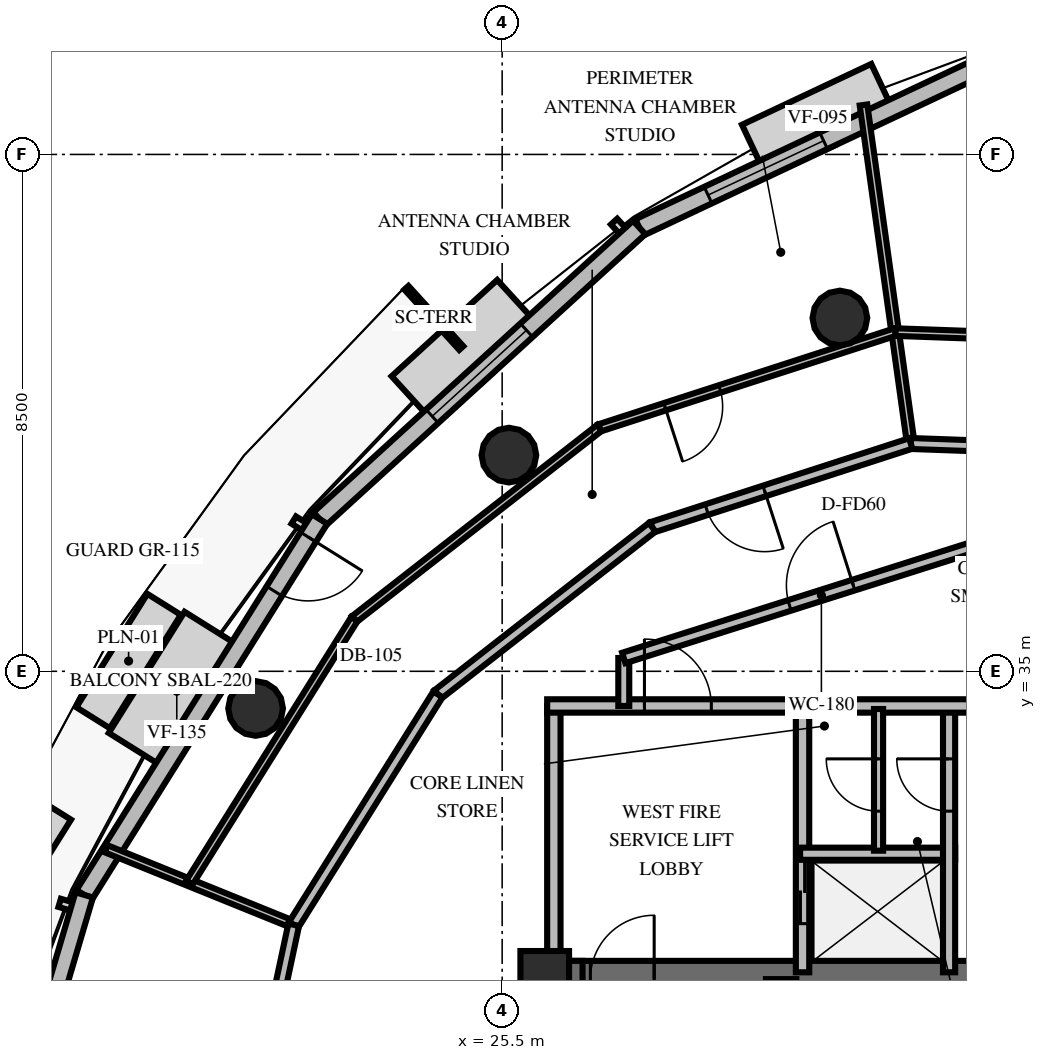
"""IFC4 building model, lengths in metres.
Left out: names, types, materials, properties, quantities, classifications, styles, units other than length and angle.
Written with IfcOpenShell. Run it as: python <this file> out.ifc"""

import sys

from ifc_helpers import new_model, si_unit, direction, frame, frame_2d, origin, origin_2d, place, context, subcontext, project, spatial, rectangle, circle, extrude, element, fill, save


model = new_model("IFC4")
c1 = context("Model", 3, precision=1e-05, world=origin(), true_north=direction((0.0, 1.0)))
c2 = subcontext(c1, "Body", "Model", "MODEL_VIEW")
j1 = project(units=[si_unit("LENGTHUNIT", "METRE"), si_unit("PLANEANGLEUNIT", "RADIAN")], contexts=[c1])
p1 = place(None, origin())
s1 = spatial("IfcSite", under=j1, at=p1, CompositionType="ELEMENT")
p2 = place(p1, origin())
s2 = spatial("IfcBuilding", under=s1, at=p2, CompositionType="ELEMENT")
p3 = place(p2, frame((0.0, 0.0, 270.0)))
s3 = spatial("IfcBuildingStorey", under=s2, at=p3, CompositionType="ELEMENT", Elevation=270.0)
p4 = place(p3, frame((26.222, 29.938, 0.0), z_axis=(0.0, 0.0, 1.0), x_axis=(1.0, 0.0, 0.0)))
e1 = element("IfcWall", 1, at=p4, inside=s3, PredefinedType="SHEAR", context=c2, shape_type="SweptSolid", body=[
    extrude(rectangle(XDim=15.566, YDim=0.6, at=frame_2d((7.783, 0.0))), origin(), (0.0, 0.0, 1.0), 3.6),
])
p5 = place(p4, frame((0.728, 0.0, 0.0)))
e2 = element("IfcOpeningElement", 2, at=p5, cuts=e1, PredefinedType="OPENING", context=c2, shape_type="SweptSolid", body=[
    extrude(rectangle(XDim=1.05, YDim=2.15, at=frame_2d((0.525, 1.075))), frame((0.0, 0.31, 0.0), z_axis=(0.0, -1.0, 0.0), x_axis=(1.0, 0.0, 0.0)), (0.0, 0.0, 1.0), 0.62),
])
p6 = place(p4, frame((13.778, 0.0, 0.0)))
e3 = element("IfcOpeningElement", 3, at=p6, cuts=e1, PredefinedType="OPENING", context=c2, shape_type="SweptSolid", body=[
    extrude(rectangle(XDim=1.05, YDim=2.15, at=frame_2d((0.525, 1.075))), frame((0.0, 0.31, 0.0), z_axis=(0.0, -1.0, 0.0), x_axis=(1.0, 0.0, 0.0)), (0.0, 0.0, 1.0), 0.62),
])
p7 = place(p4, frame((7.228, 0.0, 0.0)))
e4 = element("IfcOpeningElement", 4, at=p7, cuts=e1, PredefinedType="OPENING", context=c2, shape_type="SweptSolid", body=[
    extrude(rectangle(XDim=1.1, YDim=2.15, at=frame_2d((0.55, 1.075))), frame((0.0, 0.31, 0.0), z_axis=(0.0, -1.0, 0.0), x_axis=(1.0, 0.0, 0.0)), (0.0, 0.0, 1.0), 0.62),
])
p8 = place(p3, frame((26.522, 19.962, 0.0), z_axis=(0.0, 0.0, 1.0), x_axis=(0.0, 1.0, 0.0)))
e5 = element("IfcWall", 5, at=p8, inside=s3, PredefinedType="SHEAR", context=c2, shape_type="SweptSolid", body=[
    extrude(rectangle(XDim=10.276, YDim=0.6, at=frame_2d((5.138, 0.0))), origin(), (0.0, 0.0, 1.0), 3.6),
])
p9 = place(p3, frame((30.088, 20.262, 0.0), z_axis=(0.0, 0.0, 1.0), x_axis=(0.0, 1.0, 0.0)))
e6 = element("IfcWall", 6, at=p9, inside=s3, PredefinedType="SHEAR", context=c2, shape_type="SweptSolid", body=[
    extrude(rectangle(XDim=9.676, YDim=0.5, at=frame_2d((4.838, 0.0))), origin(), (0.0, 0.0, 1.0), 3.6),
])
p10 = place(p3, frame((26.2, 30.0, 0.0), z_axis=(0.0, 0.0, 1.0), x_axis=(1.0, 0.0, 0.0)))
e7 = element("IfcColumn", 7, at=p10, inside=s3, PredefinedType="PILASTER", context=c2, shape_type="SweptSolid", body=[
    extrude(rectangle(XDim=0.8, YDim=0.8, at=origin_2d()), origin(), (0.0, 0.0, 1.0), 3.6),
])
for number, where, z_axis, x_axis in (
    (8, (31.054, 40.81, 0.0), (0.0, 0.0, 1.0), (1.0, 0.0, 0.0)),
    (9, (25.611, 38.555, 0.0), (0.0, 0.0, 1.0), (1.0, 0.0, 0.0)),
    (10, (21.445, 34.389, 0.0), (0.0, 0.0, 1.0), (1.0, 0.0, 0.0)),
):
    element("IfcColumn", number, at=place(p3, frame(where, z_axis=z_axis, x_axis=x_axis)), inside=s3, PredefinedType="COLUMN", context=c2, shape_type="SweptSolid", body=[
        extrude(circle(Radius=0.45, at=origin_2d()), origin(), (0.0, 0.0, 1.0), 3.6),
    ])
p11 = place(p3, frame((33.765, 45.127, 0.0), z_axis=(0.0, 0.0, 1.0), x_axis=(-0.904858675558, -0.425712082595, 0.0)))
e11 = element("IfcWall", 11, at=p11, inside=s3, PredefinedType="SOLIDWALL", context=c2, shape_type="SweptSolid", body=[
    extrude(rectangle(XDim=6.643, YDim=0.3, at=frame_2d((3.322, 0.0))), origin(), (0.0, 0.0, 1.0), 2.76),
])
p12 = place(p11, frame((3.292, 0.0, 0.8)))
e12 = element("IfcOpeningElement", 12, at=p12, cuts=e11, PredefinedType="OPENING", context=c2, shape_type="SweptSolid", body=[
    extrude(rectangle(XDim=2.1, YDim=1.85, at=frame_2d((1.05, 0.925))), frame((0.0, 0.16, 0.0), z_axis=(0.0, -1.0, 0.0), x_axis=(1.0, 0.0, 0.0)), (0.0, 0.0, 1.0), 0.32),
])
p13 = place(p3, frame((27.754, 42.299, 0.0), z_axis=(0.0, 0.0, 1.0), x_axis=(-0.738936247596, -0.673775349793, 0.0)))
e13 = element("IfcWall", 13, at=p13, inside=s3, PredefinedType="SOLIDWALL", context=c2, shape_type="SweptSolid", body=[
    extrude(rectangle(XDim=7.115, YDim=0.3, at=frame_2d((3.558, 0.0))), origin(), (0.0, 0.0, 1.0), 2.76),
])
p14 = place(p13, frame((2.508, 0.0, 0.8)))
e14 = element("IfcOpeningElement", 14, at=p14, cuts=e13, PredefinedType="OPENING", context=c2, shape_type="SweptSolid", body=[
    extrude(rectangle(XDim=2.1, YDim=1.85, at=frame_2d((1.05, 0.925))), frame((0.0, 0.16, 0.0), z_axis=(0.0, -1.0, 0.0), x_axis=(1.0, 0.0, 0.0)), (0.0, 0.0, 1.0), 0.32),
])
p15 = place(p3, frame((22.496, 37.505, 0.0), z_axis=(0.0, 0.0, 1.0), x_axis=(-0.530648729616, -0.847591839129, 0.0)))
e15 = element("IfcWall", 15, at=p15, inside=s3, PredefinedType="SOLIDWALL", context=c2, shape_type="SweptSolid", body=[
    extrude(rectangle(XDim=7.293, YDim=0.3, at=frame_2d((3.646, 0.0))), origin(), (0.0, 0.0, 1.0), 2.76),
])
p16 = place(p15, frame((0.35, 0.0, 0.0)))
e16 = element("IfcOpeningElement", 16, at=p16, cuts=e15, PredefinedType="OPENING", context=c2, shape_type="SweptSolid", body=[
    extrude(rectangle(XDim=1.05, YDim=2.15, at=frame_2d((0.525, 1.075))), frame((0.0, 0.16, 0.0), z_axis=(0.0, -1.0, 0.0), x_axis=(1.0, 0.0, 0.0)), (0.0, 0.0, 1.0), 0.32),
])
p17 = place(p3, frame((18.626, 31.323, 0.0), z_axis=(0.0, 0.0, 1.0), x_axis=(-0.283347575433, -0.959017284253, 0.0)))
e17 = element("IfcWall", 17, at=p17, inside=s3, PredefinedType="SOLIDWALL", context=c2, shape_type="SweptSolid", body=[
    extrude(rectangle(XDim=7.115, YDim=0.3, at=frame_2d((3.558, 0.0))), origin(), (0.0, 0.0, 1.0), 2.76),
])
p18 = place(p17, frame((2.508, 0.0, 0.8)))
e18 = element("IfcOpeningElement", 18, at=p18, cuts=e17, PredefinedType="OPENING", context=c2, shape_type="SweptSolid", body=[
    extrude(rectangle(XDim=2.1, YDim=1.85, at=frame_2d((1.05, 0.925))), frame((0.0, 0.16, 0.0), z_axis=(0.0, -1.0, 0.0), x_axis=(1.0, 0.0, 0.0)), (0.0, 0.0, 1.0), 0.32),
])
p19 = place(p3, frame((26.35, 30.05, 0.0), z_axis=(0.0, 0.0, 1.0), x_axis=(0.0, 1.0, 0.0)))
e19 = element("IfcWall", 19, at=p19, inside=s3, PredefinedType="SOLIDWALL", context=c2, shape_type="SweptSolid", body=[
    extrude(rectangle(XDim=4.38, YDim=0.22, at=frame_2d((2.19, 0.0))), origin(), (0.0, 0.0, 1.0), 2.46),
])
p20 = place(p3, frame((30.44, 30.05, 0.0), z_axis=(0.0, 0.0, 1.0), x_axis=(0.0, 1.0, 0.0)))
e20 = element("IfcWall", 20, at=p20, inside=s3, PredefinedType="SOLIDWALL", context=c2, shape_type="SweptSolid", body=[
    extrude(rectangle(XDim=4.38, YDim=0.22, at=frame_2d((2.19, 0.0))), origin(), (0.0, 0.0, 1.0), 2.46),
])
p21 = place(p20, frame((0.8, 0.0, 0.0)))
e21 = element("IfcOpeningElement", 21, at=p21, cuts=e20, PredefinedType="OPENING", context=c2, shape_type="SweptSolid", body=[
    extrude(rectangle(XDim=1.05, YDim=2.1, at=frame_2d((0.525, 1.05))), frame((0.0, 0.12, 0.0), z_axis=(0.0, -1.0, 0.0), x_axis=(1.0, 0.0, 0.0)), (0.0, 0.0, 1.0), 0.24),
])
p22 = place(p3, frame((26.24, 34.43, 0.0), z_axis=(0.0, 0.0, 1.0), x_axis=(1.0, 0.0, 0.0)))
e22 = element("IfcWall", 22, at=p22, inside=s3, PredefinedType="SOLIDWALL", context=c2, shape_type="SweptSolid", body=[
    extrude(rectangle(XDim=4.31, YDim=0.22, at=frame_2d((2.155, 0.0))), origin(), (0.0, 0.0, 1.0), 2.46),
])
p23 = place(p22, frame((1.6, 0.0, 0.0)))
e23 = element("IfcOpeningElement", 23, at=p23, cuts=e22, PredefinedType="OPENING", context=c2, shape_type="SweptSolid", body=[
    extrude(rectangle(XDim=1.1, YDim=2.15, at=frame_2d((0.55, 1.075))), frame((0.0, 0.12, 0.0), z_axis=(0.0, -1.0, 0.0), x_axis=(1.0, 0.0, 0.0)), (0.0, 0.0, 1.0), 0.24),
])
p24 = place(p3, frame((30.4, 32.0, 0.0), z_axis=(0.0, 0.0, 1.0), x_axis=(1.0, 0.0, 0.0)))
e24 = element("IfcWall", 24, at=p24, inside=s3, PredefinedType="SOLIDWALL", context=c2, shape_type="SweptSolid", body=[
    extrude(rectangle(XDim=2.55, YDim=0.2, at=frame_2d((1.275, 0.0))), origin(), (0.0, 0.0, 1.0), 2.46),
])
p25 = place(p3, frame((32.85, 30.05, 0.0), z_axis=(0.0, 0.0, 1.0), x_axis=(0.0, 1.0, 0.0)))
e25 = element("IfcWall", 25, at=p25, inside=s3, PredefinedType="SOLIDWALL", context=c2, shape_type="SweptSolid", body=[
    extrude(rectangle(XDim=4.38, YDim=0.2, at=frame_2d((2.19, 0.0))), origin(), (0.0, 0.0, 1.0), 2.46),
])
p26 = place(p25, frame((2.65, 0.0, 0.0)))
e26 = element("IfcOpeningElement", 26, at=p26, cuts=e25, PredefinedType="OPENING", context=c2, shape_type="SweptSolid", body=[
    extrude(rectangle(XDim=0.86, YDim=2.05, at=frame_2d((0.43, 1.025))), frame((0.0, 0.11, 0.0), z_axis=(0.0, -1.0, 0.0), x_axis=(1.0, 0.0, 0.0)), (0.0, 0.0, 1.0), 0.22),
])
p27 = place(p3, frame((30.44, 34.43, 0.0), z_axis=(0.0, 0.0, 1.0), x_axis=(1.0, 0.0, 0.0)))
e27 = element("IfcWall", 27, at=p27, inside=s3, PredefinedType="SOLIDWALL", context=c2, shape_type="SweptSolid", body=[
    extrude(rectangle(XDim=7.12, YDim=0.22, at=frame_2d((3.56, 0.0))), origin(), (0.0, 0.0, 1.0), 2.46),
])
p28 = place(p27, frame((3.01, 0.0, 0.0)))
e28 = element("IfcOpeningElement", 28, at=p28, cuts=e27, PredefinedType="OPENING", context=c2, shape_type="SweptSolid", body=[
    extrude(rectangle(XDim=1.1, YDim=2.15, at=frame_2d((0.55, 1.075))), frame((0.0, 0.12, 0.0), z_axis=(0.0, -1.0, 0.0), x_axis=(1.0, 0.0, 0.0)), (0.0, 0.0, 1.0), 0.24),
])
p29 = place(p3, frame((31.69, 32.05, 0.0), z_axis=(0.0, 0.0, 1.0), x_axis=(0.0, 1.0, 0.0)))
e29 = element("IfcWall", 29, at=p29, inside=s3, PredefinedType="PARTITIONING", context=c2, shape_type="SweptSolid", body=[
    extrude(rectangle(XDim=2.33, YDim=0.15, at=frame_2d((1.165, 0.0))), origin(), (0.0, 0.0, 1.0), 2.46),
])
p30 = place(p29, frame((0.65, 0.0, 0.0)))
e30 = element("IfcOpeningElement", 30, at=p30, cuts=e29, PredefinedType="OPENING", context=c2, shape_type="SweptSolid", body=[
    extrude(rectangle(XDim=0.86, YDim=2.05, at=frame_2d((0.43, 1.025))), frame((0.0, 0.085, 0.0), z_axis=(0.0, -1.0, 0.0), x_axis=(1.0, 0.0, 0.0)), (0.0, 0.0, 1.0), 0.17),
])
p31 = place(p3, frame((27.5, 34.43, 0.0), z_axis=(0.0, 0.0, 1.0), x_axis=(0.0, 1.0, 0.0)))
e31 = element("IfcWall", 31, at=p31, inside=s3, PredefinedType="PARTITIONING", context=c2, shape_type="SweptSolid", body=[
    extrude(rectangle(XDim=0.789, YDim=0.18, at=frame_2d((0.395, 0.0))), origin(), (0.0, 0.0, 1.0), 2.46),
])
p32 = place(p3, frame((27.5, 35.219, 0.0), z_axis=(0.0, 0.0, 1.0), x_axis=(0.953228121756, 0.302251795518, 0.0)))
e32 = element("IfcWall", 32, at=p32, inside=s3, PredefinedType="PARTITIONING", context=c2, shape_type="SweptSolid", body=[
    extrude(rectangle(XDim=6.819, YDim=0.18, at=frame_2d((3.409, 0.0))), origin(), (0.0, 0.0, 1.0), 2.46),
])
p33 = place(p32, frame((2.86, 0.0, 0.0)))
e33 = element("IfcOpeningElement", 33, at=p33, cuts=e32, PredefinedType="OPENING", context=c2, shape_type="SweptSolid", body=[
    extrude(rectangle(XDim=1.1, YDim=2.15, at=frame_2d((0.55, 1.075))), frame((0.0, 0.1, 0.0), z_axis=(0.0, -1.0, 0.0), x_axis=(1.0, 0.0, 0.0)), (0.0, 0.0, 1.0), 0.2),
])
p34 = place(p3, frame((32.22, 38.746, 0.0), z_axis=(0.0, 0.0, 1.0), x_axis=(-0.138331765083, 0.990385946371, 0.0)))
e34 = element("IfcWall", 34, at=p34, inside=s3, PredefinedType="PARTITIONING", context=c2, shape_type="SweptSolid", body=[
    extrude(rectangle(XDim=5.621, YDim=0.125, at=frame_2d((2.811, 0.0))), origin(), (0.0, 0.0, 1.0), 2.46),
])
p35 = place(p3, frame((36.687, 38.586, 0.0), z_axis=(0.0, 0.0, 1.0), x_axis=(-0.999359789069, 0.035777255238, 0.0)))
e35 = element("IfcWall", 35, at=p35, inside=s3, PredefinedType="PARTITIONING", context=c2, shape_type="SweptSolid", body=[
    extrude(rectangle(XDim=4.47, YDim=0.18, at=frame_2d((2.235, 0.0))), origin(), (0.0, 0.0, 1.0), 2.46),
])
p36 = place(p3, frame((37.073, 40.396, 0.0), z_axis=(0.0, 0.0, 1.0), x_axis=(-0.999360052784, 0.035769888155, 0.0)))
e36 = element("IfcWall", 36, at=p36, inside=s3, PredefinedType="PARTITIONING", context=c2, shape_type="SweptSolid", body=[
    extrude(rectangle(XDim=5.112, YDim=0.125, at=frame_2d((2.556, 0.0))), origin(), (0.0, 0.0, 1.0), 2.46),
])
p37 = place(p3, frame((22.071, 30.832, 0.0), z_axis=(0.0, 0.0, 1.0), x_axis=(-0.92686060816, 0.375405664637, 0.0)))
e37 = element("IfcWall", 37, at=p37, inside=s3, PredefinedType="PARTITIONING", context=c2, shape_type="SweptSolid", body=[
    extrude(rectangle(XDim=3.331, YDim=0.125, at=frame_2d((1.666, 0.0))), origin(), (0.0, 0.0, 1.0), 2.46),
])
p38 = place(p3, frame((32.22, 38.746, 0.0), z_axis=(0.0, 0.0, 1.0), x_axis=(-0.951331063375, -0.30817074465, 0.0)))
e38 = element("IfcWall", 38, at=p38, inside=s3, PredefinedType="PARTITIONING", context=c2, shape_type="SweptSolid", body=[
    extrude(rectangle(XDim=4.47, YDim=0.18, at=frame_2d((2.235, 0.0))), origin(), (0.0, 0.0, 1.0), 2.46),
])
p39 = place(p38, frame((2.527, 0.0, 0.0)))
e39 = element("IfcOpeningElement", 39, at=p39, cuts=e38, PredefinedType="OPENING", context=c2, shape_type="SweptSolid", body=[
    extrude(rectangle(XDim=1.0, YDim=2.15, at=frame_2d((0.5, 1.075))), frame((0.0, 0.1, 0.0), z_axis=(0.0, -1.0, 0.0), x_axis=(1.0, 0.0, 0.0)), (0.0, 0.0, 1.0), 0.2),
])
for number, where, z_axis, x_axis in (
    (40, (27.968, 37.369, 0.0), (0.0, 0.0, 1.0), (-0.789, -0.615, 0.0)),
    (41, (24.443, 34.62, 0.0), (0.0, 0.0, 1.0), (-0.531, -0.848, 0.0)),
):
    element("IfcWall", number, at=place(p3, frame(where, z_axis=z_axis, x_axis=x_axis)), inside=s3, PredefinedType="PARTITIONING", context=c2, shape_type="SweptSolid", body=[
        extrude(rectangle(XDim=4.47, YDim=0.18, at=frame_2d((2.235, 0.0))), origin(), (0.0, 0.0, 1.0), 2.46),
    ])
p40 = place(p3, frame((31.964, 40.579, 0.0), z_axis=(0.0, 0.0, 1.0), x_axis=(-0.95131897624, -0.308208055452, 0.0)))
e42 = element("IfcWall", 42, at=p40, inside=s3, PredefinedType="PARTITIONING", context=c2, shape_type="SweptSolid", body=[
    extrude(rectangle(XDim=5.112, YDim=0.125, at=frame_2d((2.556, 0.0))), origin(), (0.0, 0.0, 1.0), 2.46),
])
p41 = place(p40, frame((3.032, 0.0, 0.0)))
e43 = element("IfcOpeningElement", 43, at=p41, cuts=e42, PredefinedType="OPENING", context=c2, shape_type="SweptSolid", body=[
    extrude(rectangle(XDim=0.95, YDim=2.15, at=frame_2d((0.475, 1.075))), frame((0.0, 0.073, 0.0), z_axis=(0.0, -1.0, 0.0), x_axis=(1.0, 0.0, 0.0)), (0.0, 0.0, 1.0), 0.145),
])
p42 = place(p3, frame((27.101, 39.003, 0.0), z_axis=(0.0, 0.0, 1.0), x_axis=(-0.78853889841, -0.614984882492, 0.0)))
e44 = element("IfcWall", 44, at=p42, inside=s3, PredefinedType="PARTITIONING", context=c2, shape_type="SweptSolid", body=[
    extrude(rectangle(XDim=5.112, YDim=0.125, at=frame_2d((2.556, 0.0))), origin(), (0.0, 0.0, 1.0), 2.46),
])
p43 = place(p3, frame((23.07, 35.859, 0.0), z_axis=(0.0, 0.0, 1.0), x_axis=(-0.530668436663, -0.84757950089, 0.0)))
e45 = element("IfcWall", 45, at=p43, inside=s3, PredefinedType="PARTITIONING", context=c2, shape_type="SweptSolid", body=[
    extrude(rectangle(XDim=5.112, YDim=0.125, at=frame_2d((2.556, 0.0))), origin(), (0.0, 0.0, 1.0), 2.46),
])
p44 = place(p3, frame((22.071, 30.832, 0.0), z_axis=(0.0, 0.0, 1.0), x_axis=(-0.208768037522, -0.977965186757, 0.0)))
e46 = element("IfcWall", 46, at=p44, inside=s3, PredefinedType="PARTITIONING", context=c2, shape_type="SweptSolid", body=[
    extrude(rectangle(XDim=4.469, YDim=0.18, at=frame_2d((2.235, 0.0))), origin(), (0.0, 0.0, 1.0), 2.46),
])
p45 = place(p12, origin())
e47 = element("IfcWindow", 47, at=p45, inside=s3, PartitioningType="SINGLE_PANEL", PredefinedType="WINDOW", context=c2, shape_type="SweptSolid", body=[
    extrude(rectangle(XDim=2.1, YDim=1.85, at=frame_2d((1.05, 0.925))), frame((0.0, 0.03, 0.0), z_axis=(0.0, -1.0, 0.0), x_axis=(1.0, 0.0, 0.0)), (0.0, 0.0, 1.0), 0.06),
])
fill(e12, e47)
p46 = place(p14, origin())
e48 = element("IfcWindow", 48, at=p46, inside=s3, PartitioningType="SINGLE_PANEL", PredefinedType="WINDOW", context=c2, shape_type="SweptSolid", body=[
    extrude(rectangle(XDim=2.1, YDim=1.85, at=frame_2d((1.05, 0.925))), frame((0.0, 0.03, 0.0), z_axis=(0.0, -1.0, 0.0), x_axis=(1.0, 0.0, 0.0)), (0.0, 0.0, 1.0), 0.06),
])
fill(e14, e48)
p47 = place(p16, origin())
e49 = element("IfcDoor", 49, at=p47, inside=s3, OperationType="SINGLE_SWING_LEFT", PredefinedType="DOOR", context=c2, shape_type="SweptSolid", body=[
    extrude(rectangle(XDim=1.05, YDim=2.15, at=frame_2d((0.525, 1.075))), frame((0.0, 0.025, 0.0), z_axis=(0.0, -1.0, 0.0), x_axis=(1.0, 0.0, 0.0)), (0.0, 0.0, 1.0), 0.05),
])
fill(e16, e49)
p48 = place(p5, origin())
e50 = element("IfcDoor", 50, at=p48, inside=s3, OperationType="SINGLE_SWING_RIGHT", PredefinedType="DOOR", context=c2, shape_type="SweptSolid", body=[
    extrude(rectangle(XDim=1.05, YDim=2.15, at=frame_2d((0.525, 1.075))), frame((0.0, 0.025, 0.0), z_axis=(0.0, -1.0, 0.0), x_axis=(1.0, 0.0, 0.0)), (0.0, 0.0, 1.0), 0.05),
])
fill(e2, e50)
p49 = place(p23, origin())
e51 = element("IfcDoor", 51, at=p49, inside=s3, OperationType="SINGLE_SWING_LEFT", PredefinedType="DOOR", context=c2, shape_type="SweptSolid", body=[
    extrude(rectangle(XDim=1.1, YDim=2.15, at=frame_2d((0.55, 1.075))), frame((0.0, 0.025, 0.0), z_axis=(0.0, -1.0, 0.0), x_axis=(1.0, 0.0, 0.0)), (0.0, 0.0, 1.0), 0.05),
])
fill(e23, e51)
p50 = place(p21, origin())
e52 = element("IfcDoor", 52, at=p50, inside=s3, OperationType="DOUBLE_DOOR_SLIDING", PredefinedType="USERDEFINED", context=c2, shape_type="SweptSolid", body=[
    extrude(rectangle(XDim=1.05, YDim=2.1, at=frame_2d((0.525, 1.05))), frame((0.0, 0.025, 0.0), z_axis=(0.0, -1.0, 0.0), x_axis=(1.0, 0.0, 0.0)), (0.0, 0.0, 1.0), 0.05),
])
fill(e21, e52)
p51 = place(p26, origin())
e53 = element("IfcDoor", 53, at=p51, inside=s3, OperationType="SINGLE_SWING_RIGHT", PredefinedType="TRAPDOOR", context=c2, shape_type="SweptSolid", body=[
    extrude(rectangle(XDim=0.86, YDim=2.05, at=frame_2d((0.43, 1.025))), frame((0.0, 0.025, 0.0), z_axis=(0.0, -1.0, 0.0), x_axis=(1.0, 0.0, 0.0)), (0.0, 0.0, 1.0), 0.05),
])
fill(e26, e53)
p52 = place(p30, origin())
e54 = element("IfcDoor", 54, at=p52, inside=s3, OperationType="SINGLE_SWING_RIGHT", PredefinedType="TRAPDOOR", context=c2, shape_type="SweptSolid", body=[
    extrude(rectangle(XDim=0.86, YDim=2.05, at=frame_2d((0.43, 1.025))), frame((0.0, 0.025, 0.0), z_axis=(0.0, -1.0, 0.0), x_axis=(1.0, 0.0, 0.0)), (0.0, 0.0, 1.0), 0.05),
])
fill(e30, e54)
p53 = place(p33, origin())
e55 = element("IfcDoor", 55, at=p53, inside=s3, OperationType="SINGLE_SWING_RIGHT", PredefinedType="DOOR", context=c2, shape_type="SweptSolid", body=[
    extrude(rectangle(XDim=1.1, YDim=2.15, at=frame_2d((0.55, 1.075))), frame((0.0, 0.025, 0.0), z_axis=(0.0, -1.0, 0.0), x_axis=(1.0, 0.0, 0.0)), (0.0, 0.0, 1.0), 0.05),
])
fill(e33, e55)
p54 = place(p39, origin())
e56 = element("IfcDoor", 56, at=p54, inside=s3, OperationType="SINGLE_SWING_LEFT", PredefinedType="DOOR", context=c2, shape_type="SweptSolid", body=[
    extrude(rectangle(XDim=1.0, YDim=2.15, at=frame_2d((0.5, 1.075))), frame((0.0, 0.025, 0.0), z_axis=(0.0, -1.0, 0.0), x_axis=(1.0, 0.0, 0.0)), (0.0, 0.0, 1.0), 0.05),
])
fill(e39, e56)
p55 = place(p41, origin())
e57 = element("IfcDoor", 57, at=p55, inside=s3, OperationType="SINGLE_SWING_RIGHT", PredefinedType="DOOR", context=c2, shape_type="SweptSolid", body=[
    extrude(rectangle(XDim=0.95, YDim=2.15, at=frame_2d((0.475, 1.075))), frame((0.0, 0.025, 0.0), z_axis=(0.0, -1.0, 0.0), x_axis=(1.0, 0.0, 0.0)), (0.0, 0.0, 1.0), 0.05),
])
fill(e43, e57)
save(model, sys.argv[1])
